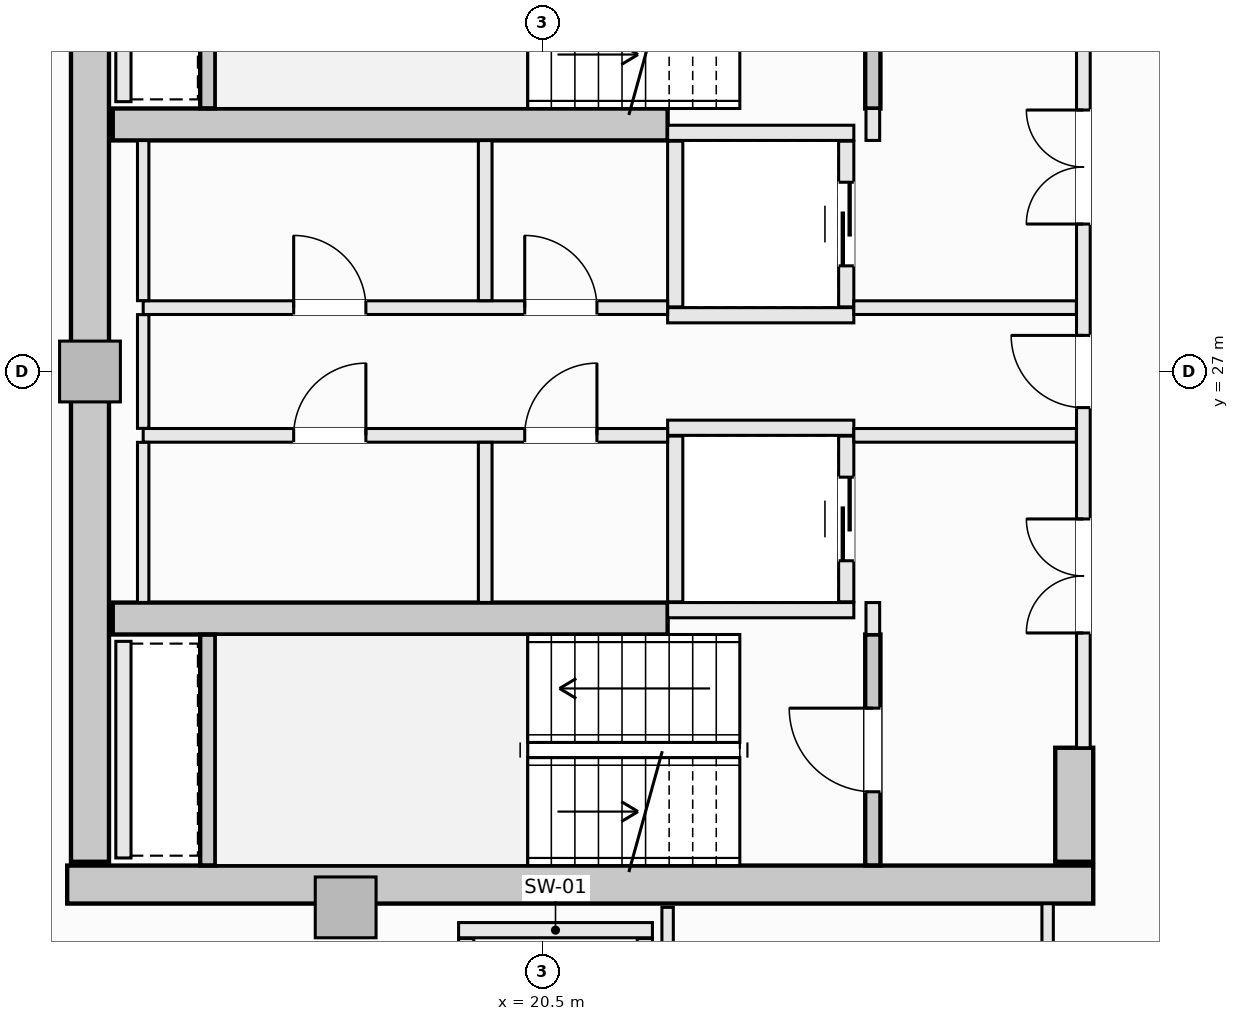
"""IFC4 building model, lengths in metres.
Left out: names, types, materials, properties, quantities, classifications, styles, units other than length and angle.
Written with IfcOpenShell. Run it as: python <this file> out.ifc"""

import sys

from ifc_helpers import new_model, si_unit, direction, frame, frame_2d, origin, origin_2d, place, context, subcontext, project, spatial, rectangle, extrude, element, fill, save


model = new_model("IFC4")
c1 = context("Model", 3, precision=1e-05, world=origin(), true_north=direction((0.0, 1.0)))
c2 = subcontext(c1, "Body", "Model", "MODEL_VIEW")
j1 = project(units=[si_unit("LENGTHUNIT", "METRE"), si_unit("PLANEANGLEUNIT", "RADIAN")], contexts=[c1])
p1 = place(None, origin())
s1 = spatial("IfcSite", under=j1, at=p1, CompositionType="ELEMENT")
p2 = place(p1, origin())
s2 = spatial("IfcBuilding", under=s1, at=p2, CompositionType="ELEMENT")
p3 = place(p2, frame((0.0, 0.0, 199.7)))
s3 = spatial("IfcBuildingStorey", under=s2, at=p3, CompositionType="ELEMENT", Elevation=199.7)
p4 = place(p3, frame((14.25, 20.25, -0.27), z_axis=(0.0, 0.0, 1.0), x_axis=(1.0, 0.0, 0.0)))
e1 = element("IfcWall", 1, at=p4, inside=s3, PredefinedType="SHEAR", context=c2, shape_type="SweptSolid", body=[
    extrude(rectangle(XDim=13.5, YDim=0.5, at=frame_2d((6.75, 0.0))), origin(), (0.0, 0.0, 1.0), 3.3),
])
p5 = place(p3, frame((14.55, 20.55, -0.27), z_axis=(0.0, 0.0, 1.0), x_axis=(0.0, 1.0, 0.0)))
e2 = element("IfcWall", 2, at=p5, inside=s3, PredefinedType="SHEAR", context=c2, shape_type="SweptSolid", body=[
    extrude(rectangle(XDim=12.9, YDim=0.5, at=frame_2d((6.45, 0.0))), origin(), (0.0, 0.0, 1.0), 3.3),
])
p6 = place(p3, frame((27.5, 20.55, -0.27), z_axis=(0.0, 0.0, 1.0), x_axis=(0.0, 1.0, 0.0)))
e3 = element("IfcWall", 3, at=p6, inside=s3, PredefinedType="SHEAR", context=c2, shape_type="SweptSolid", body=[
    extrude(rectangle(XDim=1.5, YDim=0.5, at=frame_2d((0.75, 0.0))), origin(), (0.0, 0.0, 1.0), 3.3),
])
for number, where, z_axis, x_axis in (
    (4, (14.85, 30.25, -0.27), (0.0, 0.0, 1.0), (1.0, 0.0, 0.0)),
    (5, (14.85, 23.75, -0.27), (0.0, 0.0, 1.0), (1.0, 0.0, 0.0)),
):
    element("IfcWall", number, at=place(p3, frame(where, z_axis=z_axis, x_axis=x_axis)), inside=s3, PredefinedType="SHEAR", context=c2, shape_type="SweptSolid", body=[
        extrude(rectangle(XDim=7.3, YDim=0.42, at=frame_2d((3.65, 0.0))), origin(), (0.0, 0.0, 1.0), 3.3),
    ])
for number, where, z_axis, x_axis in (
    (6, (14.55, 27.0, -0.27), (0.0, 0.0, 1.0), (1.0, 0.0, 0.0)),
    (7, (17.914, 19.95, -0.27), (0.0, 0.0, 1.0), (1.0, 0.0, 0.0)),
):
    element("IfcColumn", number, at=place(p3, frame(where, z_axis=z_axis, x_axis=x_axis)), inside=s3, PredefinedType="PILASTER", context=c2, shape_type="SweptSolid", body=[
        extrude(rectangle(XDim=0.8, YDim=0.8, at=origin_2d()), origin(), (0.0, 0.0, 1.0), 3.3),
    ])
p7 = place(p3, frame((24.85, 30.46, -0.27), z_axis=(0.0, 0.0, 1.0), x_axis=(0.0, 1.0, 0.0)))
e8 = element("IfcWall", 8, at=p7, inside=s3, PredefinedType="SHEAR", context=c2, shape_type="SweptSolid", body=[
    extrude(rectangle(XDim=3.038, YDim=0.2, at=frame_2d((1.519, 0.0))), origin(), (0.0, 0.0, 1.0), 3.3),
])
p8 = place(p7, frame((0.969, 0.0, 0.27)))
e9 = element("IfcOpeningElement", 9, at=p8, cuts=e8, PredefinedType="OPENING", context=c2, shape_type="SweptSolid", body=[
    extrude(rectangle(XDim=1.1, YDim=2.15, at=frame_2d((0.55, 1.075))), frame((0.0, 0.11, 0.0), z_axis=(0.0, -1.0, 0.0), x_axis=(1.0, 0.0, 0.0)), (0.0, 0.0, 1.0), 0.22),
])
p9 = place(p3, frame((16.1, 30.462, -0.27), z_axis=(0.0, 0.0, 1.0), x_axis=(0.0, 1.0, 0.0)))
e10 = element("IfcWall", 10, at=p9, inside=s3, PredefinedType="SHEAR", context=c2, shape_type="SweptSolid", body=[
    extrude(rectangle(XDim=3.036, YDim=0.2, at=frame_2d((1.518, 0.0))), origin(), (0.0, 0.0, 1.0), 3.3),
])
p10 = place(p3, frame((24.85, 20.502, -0.27), z_axis=(0.0, 0.0, 1.0), x_axis=(0.0, 1.0, 0.0)))
e11 = element("IfcWall", 11, at=p10, inside=s3, PredefinedType="SHEAR", context=c2, shape_type="SweptSolid", body=[
    extrude(rectangle(XDim=3.038, YDim=0.2, at=frame_2d((1.519, 0.0))), origin(), (0.0, 0.0, 1.0), 3.3),
])
p11 = place(p10, frame((0.969, 0.0, 0.27)))
e12 = element("IfcOpeningElement", 12, at=p11, cuts=e11, PredefinedType="OPENING", context=c2, shape_type="SweptSolid", body=[
    extrude(rectangle(XDim=1.1, YDim=2.15, at=frame_2d((0.55, 1.075))), frame((0.0, 0.11, 0.0), z_axis=(0.0, -1.0, 0.0), x_axis=(1.0, 0.0, 0.0)), (0.0, 0.0, 1.0), 0.22),
])
p12 = place(p3, frame((16.1, 20.502, -0.27), z_axis=(0.0, 0.0, 1.0), x_axis=(0.0, 1.0, 0.0)))
e13 = element("IfcWall", 13, at=p12, inside=s3, PredefinedType="SHEAR", context=c2, shape_type="SweptSolid", body=[
    extrude(rectangle(XDim=3.036, YDim=0.2, at=frame_2d((1.518, 0.0))), origin(), (0.0, 0.0, 1.0), 3.3),
])
for number, where, z_axis, x_axis in (
    (14, (22.15, 30.14, 0.0), (0.0, 0.0, 1.0), (1.0, 0.0, 0.0)),
    (15, (22.15, 27.74, 0.0), (0.0, 0.0, 1.0), (1.0, 0.0, 0.0)),
):
    element("IfcWall", number, at=place(p3, frame(where, z_axis=z_axis, x_axis=x_axis)), inside=s3, PredefinedType="SOLIDWALL", context=c2, shape_type="SweptSolid", body=[
        extrude(rectangle(XDim=2.45, YDim=0.2, at=frame_2d((1.225, 0.0))), origin(), (0.0, 0.0, 1.0), 3.03),
    ])
p13 = place(p3, frame((22.25, 27.85, 0.0), z_axis=(0.0, 0.0, 1.0), x_axis=(0.0, 1.0, 0.0)))
e16 = element("IfcWall", 16, at=p13, inside=s3, PredefinedType="SOLIDWALL", context=c2, shape_type="SweptSolid", body=[
    extrude(rectangle(XDim=2.18, YDim=0.2, at=frame_2d((1.09, 0.0))), origin(), (0.0, 0.0, 1.0), 3.03),
])
p14 = place(p3, frame((24.5, 27.85, 0.0), z_axis=(0.0, 0.0, 1.0), x_axis=(0.0, 1.0, 0.0)))
e17 = element("IfcWall", 17, at=p14, inside=s3, PredefinedType="SOLIDWALL", context=c2, shape_type="SweptSolid", body=[
    extrude(rectangle(XDim=2.18, YDim=0.2, at=frame_2d((1.09, 0.0))), origin(), (0.0, 0.0, 1.0), 3.03),
])
p15 = place(p14, frame((0.54, 0.0, 0.0)))
e18 = element("IfcOpeningElement", 18, at=p15, cuts=e17, PredefinedType="OPENING", context=c2, shape_type="SweptSolid", body=[
    extrude(rectangle(XDim=1.1, YDim=2.2, at=frame_2d((0.55, 1.1))), frame((0.0, 0.11, 0.0), z_axis=(0.0, -1.0, 0.0), x_axis=(1.0, 0.0, 0.0)), (0.0, 0.0, 1.0), 0.22),
])
for number, where, z_axis, x_axis in (
    (19, (22.15, 26.26, 0.0), (0.0, 0.0, 1.0), (1.0, 0.0, 0.0)),
    (20, (22.15, 23.86, 0.0), (0.0, 0.0, 1.0), (1.0, 0.0, 0.0)),
):
    element("IfcWall", number, at=place(p3, frame(where, z_axis=z_axis, x_axis=x_axis)), inside=s3, PredefinedType="SOLIDWALL", context=c2, shape_type="SweptSolid", body=[
        extrude(rectangle(XDim=2.45, YDim=0.2, at=frame_2d((1.225, 0.0))), origin(), (0.0, 0.0, 1.0), 3.03),
    ])
p16 = place(p3, frame((22.25, 23.97, 0.0), z_axis=(0.0, 0.0, 1.0), x_axis=(0.0, 1.0, 0.0)))
e21 = element("IfcWall", 21, at=p16, inside=s3, PredefinedType="SOLIDWALL", context=c2, shape_type="SweptSolid", body=[
    extrude(rectangle(XDim=2.18, YDim=0.2, at=frame_2d((1.09, 0.0))), origin(), (0.0, 0.0, 1.0), 3.03),
])
p17 = place(p3, frame((24.5, 23.97, 0.0), z_axis=(0.0, 0.0, 1.0), x_axis=(0.0, 1.0, 0.0)))
e22 = element("IfcWall", 22, at=p17, inside=s3, PredefinedType="SOLIDWALL", context=c2, shape_type="SweptSolid", body=[
    extrude(rectangle(XDim=2.18, YDim=0.2, at=frame_2d((1.09, 0.0))), origin(), (0.0, 0.0, 1.0), 3.03),
])
p18 = place(p17, frame((0.54, 0.0, 0.0)))
e23 = element("IfcOpeningElement", 23, at=p18, cuts=e22, PredefinedType="OPENING", context=c2, shape_type="SweptSolid", body=[
    extrude(rectangle(XDim=1.1, YDim=2.2, at=frame_2d((0.55, 1.1))), frame((0.0, 0.11, 0.0), z_axis=(0.0, -1.0, 0.0), x_axis=(1.0, 0.0, 0.0)), (0.0, 0.0, 1.0), 0.22),
])
p19 = place(p3, frame((19.4, 19.65, 0.0), z_axis=(0.0, 0.0, 1.0), x_axis=(1.0, 0.0, 0.0)))
e24 = element("IfcWall", 24, at=p19, inside=s3, PredefinedType="SOLIDWALL", context=c2, shape_type="SweptSolid", body=[
    extrude(rectangle(XDim=2.55, YDim=0.2, at=frame_2d((1.275, 0.0))), origin(), (0.0, 0.0, 1.0), 3.03),
])
for number, where, z_axis, x_axis in (
    (25, (19.5, 17.01, 0.0), (0.0, 0.0, 1.0), (0.0, 1.0, 0.0)),
    (26, (21.85, 17.01, 0.0), (0.0, 0.0, 1.0), (0.0, 1.0, 0.0)),
):
    element("IfcWall", number, at=place(p3, frame(where, z_axis=z_axis, x_axis=x_axis)), inside=s3, PredefinedType="SOLIDWALL", context=c2, shape_type="SweptSolid", body=[
        extrude(rectangle(XDim=2.53, YDim=0.2, at=frame_2d((1.265, 0.0))), origin(), (0.0, 0.0, 1.0), 3.03),
    ])
for number, where, z_axis, x_axis in (
    (27, (14.99, 30.55, 0.0), (0.0, 0.0, 1.0), (0.0, 1.0, 0.0)),
    (28, (14.99, 20.6, 0.0), (0.0, 0.0, 1.0), (0.0, 1.0, 0.0)),
):
    element("IfcWall", number, at=place(p3, frame(where, z_axis=z_axis, x_axis=x_axis)), inside=s3, PredefinedType="SOLIDWALL", context=c2, shape_type="SweptSolid", body=[
        extrude(rectangle(XDim=2.85, YDim=0.2, at=frame_2d((1.425, 0.0))), origin(), (0.0, 0.0, 1.0), 3.03),
    ])
for number, where, z_axis, x_axis in (
    (29, (24.85, 23.54, 0.0), (0.0, 0.0, 1.0), (0.0, 1.0, 0.0)),
    (30, (24.85, 30.04, 0.0), (0.0, 0.0, 1.0), (0.0, 1.0, 0.0)),
):
    element("IfcWall", number, at=place(p3, frame(where, z_axis=z_axis, x_axis=x_axis)), inside=s3, PredefinedType="SOLIDWALL", context=c2, shape_type="SweptSolid", body=[
        extrude(rectangle(XDim=0.42, YDim=0.18, at=frame_2d((0.21, 0.0))), origin(), (0.0, 0.0, 1.0), 3.03),
    ])
p20 = place(p3, frame((27.62, 22.05, 0.0), z_axis=(0.0, 0.0, 1.0), x_axis=(0.0, 1.0, 0.0)))
e31 = element("IfcWall", 31, at=p20, inside=s3, PredefinedType="SOLIDWALL", context=c2, shape_type="SweptSolid", body=[
    extrude(rectangle(XDim=9.9, YDim=0.18, at=frame_2d((4.95, 0.0))), origin(), (0.0, 0.0, 1.0), 3.03),
])
p21 = place(p20, frame((4.475, 0.0, 0.0)))
e32 = element("IfcOpeningElement", 32, at=p21, cuts=e31, PredefinedType="OPENING", context=c2, shape_type="SweptSolid", body=[
    extrude(rectangle(XDim=0.95, YDim=2.1, at=frame_2d((0.475, 1.05))), frame((0.0, 0.1, 0.0), z_axis=(0.0, -1.0, 0.0), x_axis=(1.0, 0.0, 0.0)), (0.0, 0.0, 1.0), 0.2),
])
p22 = place(p20, frame((6.89, 0.0, 0.0)))
e33 = element("IfcOpeningElement", 33, at=p22, cuts=e31, PredefinedType="OPENING", context=c2, shape_type="SweptSolid", body=[
    extrude(rectangle(XDim=1.5, YDim=2.2, at=frame_2d((0.75, 1.1))), frame((0.0, 0.1, 0.0), z_axis=(0.0, -1.0, 0.0), x_axis=(1.0, 0.0, 0.0)), (0.0, 0.0, 1.0), 0.2),
])
p23 = place(p20, frame((1.51, 0.0, 0.0)))
e34 = element("IfcOpeningElement", 34, at=p23, cuts=e31, PredefinedType="OPENING", context=c2, shape_type="SweptSolid", body=[
    extrude(rectangle(XDim=1.5, YDim=2.2, at=frame_2d((0.75, 1.1))), frame((0.0, 0.1, 0.0), z_axis=(0.0, -1.0, 0.0), x_axis=(1.0, 0.0, 0.0)), (0.0, 0.0, 1.0), 0.2),
])
p24 = place(p3, frame((15.25, 27.84, 0.0), z_axis=(0.0, 0.0, 1.0), x_axis=(1.0, 0.0, 0.0)))
e35 = element("IfcWall", 35, at=p24, inside=s3, PredefinedType="SOLIDWALL", context=c2, shape_type="SweptSolid", body=[
    extrude(rectangle(XDim=6.9, YDim=0.18, at=frame_2d((3.45, 0.0))), origin(), (0.0, 0.0, 1.0), 3.03),
])
p25 = place(p24, frame((5.02, 0.0, 0.0)))
e36 = element("IfcOpeningElement", 36, at=p25, cuts=e35, PredefinedType="OPENING", context=c2, shape_type="SweptSolid", body=[
    extrude(rectangle(XDim=0.95, YDim=2.1, at=frame_2d((0.475, 1.05))), frame((0.0, 0.1, 0.0), z_axis=(0.0, -1.0, 0.0), x_axis=(1.0, 0.0, 0.0)), (0.0, 0.0, 1.0), 0.2),
])
p26 = place(p24, frame((1.98, 0.0, 0.0)))
e37 = element("IfcOpeningElement", 37, at=p26, cuts=e35, PredefinedType="OPENING", context=c2, shape_type="SweptSolid", body=[
    extrude(rectangle(XDim=0.95, YDim=2.1, at=frame_2d((0.475, 1.05))), frame((0.0, 0.1, 0.0), z_axis=(0.0, -1.0, 0.0), x_axis=(1.0, 0.0, 0.0)), (0.0, 0.0, 1.0), 0.2),
])
p27 = place(p3, frame((24.6, 27.84, 0.0), z_axis=(0.0, 0.0, 1.0), x_axis=(1.0, 0.0, 0.0)))
e38 = element("IfcWall", 38, at=p27, inside=s3, PredefinedType="SOLIDWALL", context=c2, shape_type="SweptSolid", body=[
    extrude(rectangle(XDim=2.928, YDim=0.18, at=frame_2d((1.464, 0.0))), origin(), (0.0, 0.0, 1.0), 3.03),
])
p28 = place(p3, frame((15.25, 26.16, 0.0), z_axis=(0.0, 0.0, 1.0), x_axis=(1.0, 0.0, 0.0)))
e39 = element("IfcWall", 39, at=p28, inside=s3, PredefinedType="SOLIDWALL", context=c2, shape_type="SweptSolid", body=[
    extrude(rectangle(XDim=6.9, YDim=0.18, at=frame_2d((3.45, 0.0))), origin(), (0.0, 0.0, 1.0), 3.03),
])
p29 = place(p28, frame((5.02, 0.0, 0.0)))
e40 = element("IfcOpeningElement", 40, at=p29, cuts=e39, PredefinedType="OPENING", context=c2, shape_type="SweptSolid", body=[
    extrude(rectangle(XDim=0.95, YDim=2.1, at=frame_2d((0.475, 1.05))), frame((0.0, 0.1, 0.0), z_axis=(0.0, -1.0, 0.0), x_axis=(1.0, 0.0, 0.0)), (0.0, 0.0, 1.0), 0.2),
])
p30 = place(p28, frame((1.98, 0.0, 0.0)))
e41 = element("IfcOpeningElement", 41, at=p30, cuts=e39, PredefinedType="OPENING", context=c2, shape_type="SweptSolid", body=[
    extrude(rectangle(XDim=0.95, YDim=2.1, at=frame_2d((0.475, 1.05))), frame((0.0, 0.1, 0.0), z_axis=(0.0, -1.0, 0.0), x_axis=(1.0, 0.0, 0.0)), (0.0, 0.0, 1.0), 0.2),
])
p31 = place(p3, frame((24.6, 26.16, 0.0), z_axis=(0.0, 0.0, 1.0), x_axis=(1.0, 0.0, 0.0)))
e42 = element("IfcWall", 42, at=p31, inside=s3, PredefinedType="SOLIDWALL", context=c2, shape_type="SweptSolid", body=[
    extrude(rectangle(XDim=2.928, YDim=0.18, at=frame_2d((1.464, 0.0))), origin(), (0.0, 0.0, 1.0), 3.03),
])
p32 = place(p3, frame((15.25, 23.962, 0.0), z_axis=(0.0, 0.0, 1.0), x_axis=(0.0, 1.0, 0.0)))
e43 = element("IfcWall", 43, at=p32, inside=s3, PredefinedType="PARTITIONING", context=c2, shape_type="SweptSolid", body=[
    extrude(rectangle(XDim=2.106, YDim=0.15, at=frame_2d((1.053, 0.0))), origin(), (0.0, 0.0, 1.0), 3.03),
])
p33 = place(p3, frame((15.25, 26.252, 0.0), z_axis=(0.0, 0.0, 1.0), x_axis=(0.0, 1.0, 0.0)))
e44 = element("IfcWall", 44, at=p33, inside=s3, PredefinedType="PARTITIONING", context=c2, shape_type="SweptSolid", body=[
    extrude(rectangle(XDim=1.496, YDim=0.15, at=frame_2d((0.748, 0.0))), origin(), (0.0, 0.0, 1.0), 3.03),
])
p34 = place(p3, frame((15.25, 27.932, 0.0), z_axis=(0.0, 0.0, 1.0), x_axis=(0.0, 1.0, 0.0)))
e45 = element("IfcWall", 45, at=p34, inside=s3, PredefinedType="PARTITIONING", context=c2, shape_type="SweptSolid", body=[
    extrude(rectangle(XDim=2.106, YDim=0.15, at=frame_2d((1.053, 0.0))), origin(), (0.0, 0.0, 1.0), 3.03),
])
for number, where, z_axis, x_axis in (
    (46, (19.75, 23.962, 0.0), (0.0, 0.0, 1.0), (0.0, 1.0, 0.0)),
    (47, (19.75, 27.932, 0.0), (0.0, 0.0, 1.0), (0.0, 1.0, 0.0)),
):
    element("IfcWall", number, at=place(p3, frame(where, z_axis=z_axis, x_axis=x_axis)), inside=s3, PredefinedType="SOLIDWALL", context=c2, shape_type="SweptSolid", body=[
        extrude(rectangle(XDim=2.106, YDim=0.18, at=frame_2d((1.053, 0.0))), origin(), (0.0, 0.0, 1.0), 3.03),
    ])
p35 = place(p3, frame((22.15, 17.127, 0.0), z_axis=(0.0, 0.0, 1.0), x_axis=(0.0, 1.0, 0.0)))
e48 = element("IfcWall", 48, at=p35, inside=s3, PredefinedType="PARTITIONING", context=c2, shape_type="SweptSolid", body=[
    extrude(rectangle(XDim=2.823, YDim=0.15, at=frame_2d((1.412, 0.0))), origin(), (0.0, 0.0, 1.0), 3.03),
])
p36 = place(p3, frame((27.15, 17.127, 0.0), z_axis=(0.0, 0.0, 1.0), x_axis=(0.0, 1.0, 0.0)))
e49 = element("IfcWall", 49, at=p36, inside=s3, PredefinedType="PARTITIONING", context=c2, shape_type="SweptSolid", body=[
    extrude(rectangle(XDim=2.871, YDim=0.15, at=frame_2d((1.436, 0.0))), origin(), (0.0, 0.0, 1.0), 3.03),
])
p37 = place(p36, frame((0.96, 0.0, 0.0)))
e50 = element("IfcOpeningElement", 50, at=p37, cuts=e49, PredefinedType="OPENING", context=c2, shape_type="SweptSolid", body=[
    extrude(rectangle(XDim=0.95, YDim=2.1, at=frame_2d((0.475, 1.05))), frame((0.0, 0.085, 0.0), z_axis=(0.0, -1.0, 0.0), x_axis=(1.0, 0.0, 0.0)), (0.0, 0.0, 1.0), 0.17),
])
p38 = place(p11, origin())
e51 = element("IfcDoor", 51, at=p38, inside=s3, OperationType="SINGLE_SWING_RIGHT", PredefinedType="DOOR", context=c2, shape_type="SweptSolid", body=[
    extrude(rectangle(XDim=1.1, YDim=2.15, at=frame_2d((0.55, 1.075))), frame((0.0, 0.025, 0.0), z_axis=(0.0, -1.0, 0.0), x_axis=(1.0, 0.0, 0.0)), (0.0, 0.0, 1.0), 0.05),
])
fill(e12, e51)
p39 = place(p15, origin())
e52 = element("IfcDoor", 52, at=p39, inside=s3, OperationType="SLIDING_TO_LEFT", PredefinedType="DOOR", context=c2, shape_type="SweptSolid", body=[
    extrude(rectangle(XDim=1.1, YDim=2.2, at=frame_2d((0.55, 1.1))), frame((0.0, 0.025, 0.0), z_axis=(0.0, -1.0, 0.0), x_axis=(1.0, 0.0, 0.0)), (0.0, 0.0, 1.0), 0.05),
])
fill(e18, e52)
p40 = place(p18, origin())
e53 = element("IfcDoor", 53, at=p40, inside=s3, OperationType="SLIDING_TO_LEFT", PredefinedType="DOOR", context=c2, shape_type="SweptSolid", body=[
    extrude(rectangle(XDim=1.1, YDim=2.2, at=frame_2d((0.55, 1.1))), frame((0.0, 0.025, 0.0), z_axis=(0.0, -1.0, 0.0), x_axis=(1.0, 0.0, 0.0)), (0.0, 0.0, 1.0), 0.05),
])
fill(e23, e53)
p41 = place(p21, origin())
e54 = element("IfcDoor", 54, at=p41, inside=s3, OperationType="SINGLE_SWING_RIGHT", PredefinedType="DOOR", context=c2, shape_type="SweptSolid", body=[
    extrude(rectangle(XDim=0.95, YDim=2.1, at=frame_2d((0.475, 1.05))), frame((0.0, 0.025, 0.0), z_axis=(0.0, -1.0, 0.0), x_axis=(1.0, 0.0, 0.0)), (0.0, 0.0, 1.0), 0.05),
])
fill(e32, e54)
p42 = place(p22, origin())
e55 = element("IfcDoor", 55, at=p42, inside=s3, OperationType="DOUBLE_DOOR_SINGLE_SWING", PredefinedType="DOOR", context=c2, shape_type="SweptSolid", body=[
    extrude(rectangle(XDim=1.5, YDim=2.2, at=frame_2d((0.75, 1.1))), frame((0.0, 0.025, 0.0), z_axis=(0.0, -1.0, 0.0), x_axis=(1.0, 0.0, 0.0)), (0.0, 0.0, 1.0), 0.05),
])
fill(e33, e55)
p43 = place(p23, origin())
e56 = element("IfcDoor", 56, at=p43, inside=s3, OperationType="DOUBLE_DOOR_SINGLE_SWING", PredefinedType="DOOR", context=c2, shape_type="SweptSolid", body=[
    extrude(rectangle(XDim=1.5, YDim=2.2, at=frame_2d((0.75, 1.1))), frame((0.0, 0.025, 0.0), z_axis=(0.0, -1.0, 0.0), x_axis=(1.0, 0.0, 0.0)), (0.0, 0.0, 1.0), 0.05),
])
fill(e34, e56)
p44 = place(p25, origin())
e57 = element("IfcDoor", 57, at=p44, inside=s3, OperationType="SINGLE_SWING_LEFT", PredefinedType="DOOR", context=c2, shape_type="SweptSolid", body=[
    extrude(rectangle(XDim=0.95, YDim=2.1, at=frame_2d((0.475, 1.05))), frame((0.0, 0.025, 0.0), z_axis=(0.0, -1.0, 0.0), x_axis=(1.0, 0.0, 0.0)), (0.0, 0.0, 1.0), 0.05),
])
fill(e36, e57)
p45 = place(p29, origin())
e58 = element("IfcDoor", 58, at=p45, inside=s3, OperationType="SINGLE_SWING_RIGHT", PredefinedType="DOOR", context=c2, shape_type="SweptSolid", body=[
    extrude(rectangle(XDim=0.95, YDim=2.1, at=frame_2d((0.475, 1.05))), frame((0.0, 0.025, 0.0), z_axis=(0.0, -1.0, 0.0), x_axis=(1.0, 0.0, 0.0)), (0.0, 0.0, 1.0), 0.05),
])
fill(e40, e58)
p46 = place(p26, origin())
e59 = element("IfcDoor", 59, at=p46, inside=s3, OperationType="SINGLE_SWING_LEFT", PredefinedType="DOOR", context=c2, shape_type="SweptSolid", body=[
    extrude(rectangle(XDim=0.95, YDim=2.1, at=frame_2d((0.475, 1.05))), frame((0.0, 0.025, 0.0), z_axis=(0.0, -1.0, 0.0), x_axis=(1.0, 0.0, 0.0)), (0.0, 0.0, 1.0), 0.05),
])
fill(e37, e59)
p47 = place(p30, origin())
e60 = element("IfcDoor", 60, at=p47, inside=s3, OperationType="SINGLE_SWING_RIGHT", PredefinedType="DOOR", context=c2, shape_type="SweptSolid", body=[
    extrude(rectangle(XDim=0.95, YDim=2.1, at=frame_2d((0.475, 1.05))), frame((0.0, 0.025, 0.0), z_axis=(0.0, -1.0, 0.0), x_axis=(1.0, 0.0, 0.0)), (0.0, 0.0, 1.0), 0.05),
])
fill(e41, e60)
save(model, sys.argv[1])
